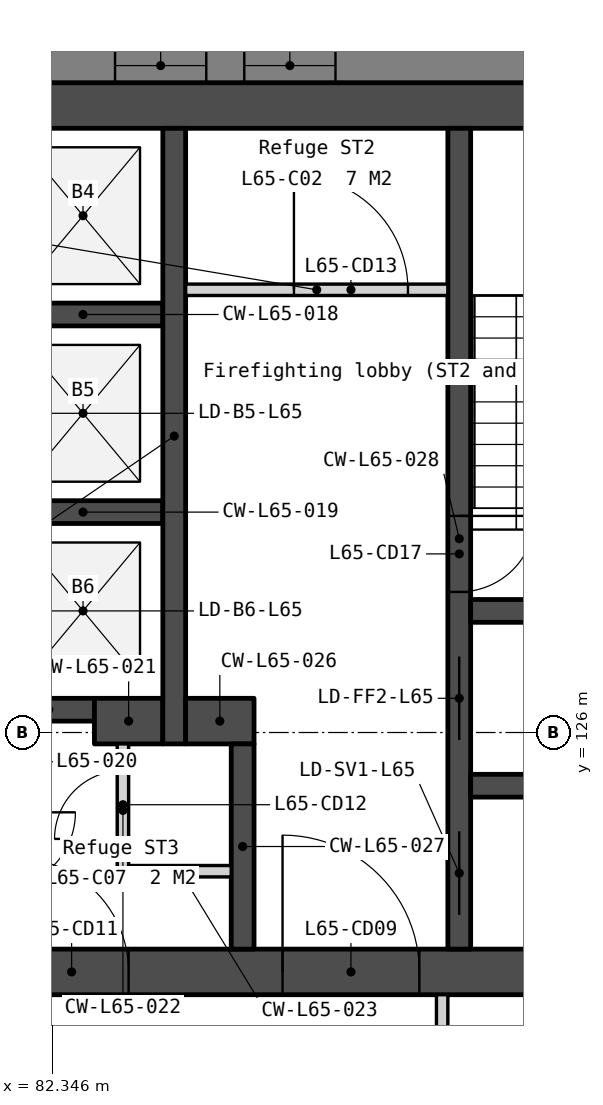
"""IFC4 building model, lengths in metres.
Left out: names, types, materials, properties, quantities, classifications, styles, units other than length and angle.
Written with IfcOpenShell. Run it as: python <this file> out.ifc"""

import sys

from ifc_helpers import new_model, si_unit, direction, frame, frame_2d, origin, place, context, subcontext, project, spatial, polyline, rectangle, outline, extrude, element, fill, save


model = new_model("IFC4")
c1 = context("Model", 3, precision=1e-05, world=origin(), true_north=direction((0.0, 1.0)))
c2 = subcontext(c1, "Body", "Model", "MODEL_VIEW")
j1 = project(units=[si_unit("LENGTHUNIT", "METRE"), si_unit("PLANEANGLEUNIT", "RADIAN")], contexts=[c1])
p1 = place(None, origin())
s1 = spatial("IfcSite", under=j1, at=p1, CompositionType="ELEMENT")
p2 = place(p1, origin())
s2 = spatial("IfcBuilding", under=s1, at=p2, CompositionType="ELEMENT")
p3 = place(p2, frame((0.0, 0.0, 266.0)))
s3 = spatial("IfcBuildingStorey", under=s2, at=p3, CompositionType="ELEMENT", Elevation=266.0)
p4 = place(p3, frame((69.0, 134.25, 0.0), z_axis=(0.0, 0.0, 1.0), x_axis=(1.0, 0.0, 0.0)))
e1 = element("IfcWall", 1, at=p4, inside=s3, PredefinedType="SOLIDWALL", context=c2, shape_type="SweptSolid", body=[
    extrude(rectangle(XDim=22.0, YDim=0.6, at=frame_2d((11.0, 0.0))), origin(), (0.0, 0.0, 1.0), 3.75),
])
p5 = place(p3, frame((69.0, 122.85, 0.0), z_axis=(0.0, 0.0, 1.0), x_axis=(1.0, 0.0, 0.0)))
e2 = element("IfcWall", 2, at=p5, inside=s3, PredefinedType="SOLIDWALL", context=c2, shape_type="SweptSolid", body=[
    extrude(rectangle(XDim=22.0, YDim=0.6, at=frame_2d((11.0, 0.0))), origin(), (0.0, 0.0, 1.0), 3.75),
])
p6 = place(p5, frame((16.375, 0.0, 0.0)))
e3 = element("IfcOpeningElement", 3, at=p6, cuts=e2, PredefinedType="OPENING", context=c2, shape_type="SweptSolid", body=[
    extrude(rectangle(XDim=1.8, YDim=2.1, at=frame_2d((0.9, 1.05))), frame((0.0, 0.31, 0.0), z_axis=(0.0, -1.0, 0.0), x_axis=(1.0, 0.0, 0.0)), (0.0, 0.0, 1.0), 0.62),
])
p7 = place(p5, frame((3.825, 0.0, 0.0)))
e4 = element("IfcOpeningElement", 4, at=p7, cuts=e2, PredefinedType="OPENING", context=c2, shape_type="SweptSolid", body=[
    extrude(rectangle(XDim=1.8, YDim=2.1, at=frame_2d((0.9, 1.05))), frame((0.0, 0.31, 0.0), z_axis=(0.0, -1.0, 0.0), x_axis=(1.0, 0.0, 0.0)), (0.0, 0.0, 1.0), 0.62),
])
p8 = place(p5, frame((12.85, 0.0, 0.0)))
e5 = element("IfcOpeningElement", 5, at=p8, cuts=e2, PredefinedType="OPENING", context=c2, shape_type="SweptSolid", body=[
    extrude(rectangle(XDim=1.5, YDim=2.1, at=frame_2d((0.75, 1.05))), frame((0.0, 0.31, 0.0), z_axis=(0.0, -1.0, 0.0), x_axis=(1.0, 0.0, 0.0)), (0.0, 0.0, 1.0), 0.62),
])
for number, where, z_axis, x_axis in (
    (6, (81.7, 131.5, 0.0), (0.0, 0.0, 1.0), (1.0, 0.0, 0.0)),
    (7, (81.7, 128.9, 0.0), (0.0, 0.0, 1.0), (1.0, 0.0, 0.0)),
):
    element("IfcWall", number, at=place(p3, frame(where, z_axis=z_axis, x_axis=x_axis)), inside=s3, PredefinedType="SOLIDWALL", context=c2, shape_type="SweptSolid", body=[
        extrude(rectangle(XDim=2.1, YDim=0.3, at=frame_2d((1.05, 0.0))), origin(), (0.0, 0.0, 1.0), 3.75),
    ])
p9 = place(p3, frame((81.7, 126.3, 0.0), z_axis=(0.0, 0.0, 1.0), x_axis=(1.0, 0.0, 0.0)))
e8 = element("IfcWall", 8, at=p9, inside=s3, PredefinedType="SOLIDWALL", context=c2, shape_type="SweptSolid", body=[
    extrude(rectangle(XDim=1.2, YDim=0.3, at=frame_2d((0.6, 0.0))), origin(), (0.0, 0.0, 1.0), 3.75),
])
p10 = place(p3, frame((82.9, 126.15, 0.0), z_axis=(0.0, 0.0, 1.0), x_axis=(1.0, 0.0, 0.0)))
e9 = element("IfcWall", 9, at=p10, inside=s3, PredefinedType="SOLIDWALL", context=c2, shape_type="SweptSolid", body=[
    extrude(rectangle(XDim=0.9, YDim=0.6, at=frame_2d((0.45, 0.0))), origin(), (0.0, 0.0, 1.0), 3.75),
])
p11 = place(p3, frame((83.275, 125.85, 0.0), z_axis=(0.0, 0.0, 1.0), x_axis=(0.0, -1.0, 0.0)))
e10 = element("IfcWall", 10, at=p11, inside=s3, PredefinedType="PARTITIONING", context=c2, shape_type="SweptSolid", body=[
    extrude(rectangle(XDim=1.75, YDim=0.15, at=frame_2d((0.875, 0.0))), origin(), (0.0, 0.0, 1.0), 3.75),
])
p12 = place(p11, frame((0.35, 0.0, 0.0)))
e11 = element("IfcOpeningElement", 11, at=p12, cuts=e10, PredefinedType="OPENING", context=c2, shape_type="SweptSolid", body=[
    extrude(rectangle(XDim=0.9, YDim=2.1, at=frame_2d((0.45, 1.05))), frame((0.0, 0.085, 0.0), z_axis=(0.0, -1.0, 0.0), x_axis=(1.0, 0.0, 0.0)), (0.0, 0.0, 1.0), 0.17),
])
p13 = place(p3, frame((83.35, 124.175, 0.0), z_axis=(0.0, 0.0, 1.0), x_axis=(1.0, 0.0, 0.0)))
e12 = element("IfcWall", 12, at=p13, inside=s3, PredefinedType="PARTITIONING", context=c2, shape_type="SweptSolid", body=[
    extrude(rectangle(XDim=1.35, YDim=0.15, at=frame_2d((0.675, 0.0))), origin(), (0.0, 0.0, 1.0), 3.75),
])
p14 = place(p3, frame((83.95, 133.95, 0.0), z_axis=(0.0, 0.0, 1.0), x_axis=(0.0, -1.0, 0.0)))
e13 = element("IfcWall", 13, at=p14, inside=s3, PredefinedType="SOLIDWALL", context=c2, shape_type="SweptSolid", body=[
    extrude(rectangle(XDim=8.1, YDim=0.3, at=frame_2d((4.05, 0.0))), origin(), (0.0, 0.0, 1.0), 3.75),
])
p15 = place(p3, frame((84.1, 131.825, 0.0), z_axis=(0.0, 0.0, 1.0), x_axis=(1.0, 0.0, 0.0)))
e14 = element("IfcWall", 14, at=p15, inside=s3, PredefinedType="PARTITIONING", context=c2, shape_type="SweptSolid", body=[
    extrude(rectangle(XDim=3.45, YDim=0.15, at=frame_2d((1.725, 0.0))), origin(), (0.0, 0.0, 1.0), 3.75),
])
p16 = place(p15, frame((1.425, 0.0, 0.0)))
e15 = element("IfcOpeningElement", 15, at=p16, cuts=e14, PredefinedType="OPENING", context=c2, shape_type="SweptSolid", body=[
    extrude(rectangle(XDim=1.5, YDim=2.1, at=frame_2d((0.75, 1.05))), frame((0.0, 0.085, 0.0), z_axis=(0.0, -1.0, 0.0), x_axis=(1.0, 0.0, 0.0)), (0.0, 0.0, 1.0), 0.17),
])
p17 = place(p3, frame((84.1, 126.15, 0.0), z_axis=(0.0, 0.0, 1.0), x_axis=(1.0, 0.0, 0.0)))
e16 = element("IfcWall", 16, at=p17, inside=s3, PredefinedType="SOLIDWALL", context=c2, shape_type="SweptSolid", body=[
    extrude(rectangle(XDim=0.9, YDim=0.6, at=frame_2d((0.45, 0.0))), origin(), (0.0, 0.0, 1.0), 3.75),
])
p18 = place(p3, frame((84.85, 125.85, 0.0), z_axis=(0.0, 0.0, 1.0), x_axis=(0.0, -1.0, 0.0)))
e17 = element("IfcWall", 17, at=p18, inside=s3, PredefinedType="SOLIDWALL", context=c2, shape_type="SweptSolid", body=[
    extrude(rectangle(XDim=2.7, YDim=0.3, at=frame_2d((1.35, 0.0))), origin(), (0.0, 0.0, 1.0), 3.75),
])
p19 = place(p3, frame((87.7, 133.95, 0.0), z_axis=(0.0, 0.0, 1.0), x_axis=(0.0, -1.0, 0.0)))
e18 = element("IfcWall", 18, at=p19, inside=s3, PredefinedType="SOLIDWALL", context=c2, shape_type="SweptSolid", body=[
    extrude(rectangle(XDim=10.8, YDim=0.3, at=frame_2d((5.4, 0.0))), origin(), (0.0, 0.0, 1.0), 3.75),
])
p20 = place(p19, frame((6.95, 0.0, 0.0)))
e19 = element("IfcOpeningElement", 19, at=p20, cuts=e18, PredefinedType="OPENING", context=c2, shape_type="SweptSolid", body=[
    extrude(rectangle(XDim=1.1, YDim=2.1, at=frame_2d((0.55, 1.05))), frame((0.0, 0.16, 0.0), z_axis=(0.0, -1.0, 0.0), x_axis=(1.0, 0.0, 0.0)), (0.0, 0.0, 1.0), 0.32),
])
p21 = place(p19, frame((5.1, 0.0, 0.0)))
e20 = element("IfcOpeningElement", 20, at=p21, cuts=e18, PredefinedType="OPENING", context=c2, shape_type="SweptSolid", body=[
    extrude(rectangle(XDim=1.0, YDim=2.1, at=frame_2d((0.5, 1.05))), frame((0.0, 0.16, 0.0), z_axis=(0.0, -1.0, 0.0), x_axis=(1.0, 0.0, 0.0)), (0.0, 0.0, 1.0), 0.32),
])
p22 = place(p19, frame((9.25, 0.0, 0.0)))
e21 = element("IfcOpeningElement", 21, at=p22, cuts=e18, PredefinedType="OPENING", context=c2, shape_type="SweptSolid", body=[
    extrude(rectangle(XDim=1.1, YDim=2.1, at=frame_2d((0.55, 1.05))), frame((0.0, 0.16, 0.0), z_axis=(0.0, -1.0, 0.0), x_axis=(1.0, 0.0, 0.0)), (0.0, 0.0, 1.0), 0.32),
])
for number, where, z_axis, x_axis in (
    (22, (87.85, 127.6, 0.0), (0.0, 0.0, 1.0), (1.0, 0.0, 0.0)),
    (23, (87.85, 125.3, 0.0), (0.0, 0.0, 1.0), (1.0, 0.0, 0.0)),
):
    element("IfcWall", number, at=place(p3, frame(where, z_axis=z_axis, x_axis=x_axis)), inside=s3, PredefinedType="SOLIDWALL", context=c2, shape_type="SweptSolid", body=[
        extrude(rectangle(XDim=2.55, YDim=0.3, at=frame_2d((1.275, 0.0))), origin(), (0.0, 0.0, 1.0), 3.75),
    ])
p23 = place(p3, frame((98.486, 134.775, -0.15), z_axis=(0.0, 0.0, 1.0), x_axis=(-1.0, 0.0, 0.0)))
e24 = element("IfcWall", 24, at=p23, inside=s3, PredefinedType="SOLIDWALL", context=c2, shape_type="SweptSolid", body=[
    extrude(outline(polyline([(36.972, 0.0), (36.972, 3.9), (0.0, 3.9), (0.0, 0.0), (36.972, 0.0)])), frame((0.0, 0.225, 0.0), z_axis=(0.0, -1.0, 0.0), x_axis=(1.0, 0.0, 0.0)), (0.0, 0.0, 1.0), 0.45),
])
p24 = place(p23, frame((3.172, 0.0, 0.95)))
e25 = element("IfcOpeningElement", 25, at=p24, cuts=e24, PredefinedType="OPENING", context=c2, shape_type="SweptSolid", body=[
    extrude(rectangle(XDim=1.2, YDim=2.2, at=frame_2d((0.6, 1.1))), frame((0.0, 0.235, 0.0), z_axis=(0.0, -1.0, 0.0), x_axis=(1.0, 0.0, 0.0)), (0.0, 0.0, 1.0), 0.47),
])
p25 = place(p23, frame((4.872, 0.0, 0.95)))
e26 = element("IfcOpeningElement", 26, at=p25, cuts=e24, PredefinedType="OPENING", context=c2, shape_type="SweptSolid", body=[
    extrude(rectangle(XDim=1.2, YDim=2.2, at=frame_2d((0.6, 1.1))), frame((0.0, 0.235, 0.0), z_axis=(0.0, -1.0, 0.0), x_axis=(1.0, 0.0, 0.0)), (0.0, 0.0, 1.0), 0.47),
])
p26 = place(p23, frame((12.415, 0.0, 0.95)))
e27 = element("IfcOpeningElement", 27, at=p26, cuts=e24, PredefinedType="OPENING", context=c2, shape_type="SweptSolid", body=[
    extrude(rectangle(XDim=1.2, YDim=2.2, at=frame_2d((0.6, 1.1))), frame((0.0, 0.235, 0.0), z_axis=(0.0, -1.0, 0.0), x_axis=(1.0, 0.0, 0.0)), (0.0, 0.0, 1.0), 0.47),
])
p27 = place(p23, frame((14.115, 0.0, 0.95)))
e28 = element("IfcOpeningElement", 28, at=p27, cuts=e24, PredefinedType="OPENING", context=c2, shape_type="SweptSolid", body=[
    extrude(rectangle(XDim=1.2, YDim=2.2, at=frame_2d((0.6, 1.1))), frame((0.0, 0.235, 0.0), z_axis=(0.0, -1.0, 0.0), x_axis=(1.0, 0.0, 0.0)), (0.0, 0.0, 1.0), 0.47),
])
p28 = place(p23, frame((21.658, 0.0, 0.95)))
e29 = element("IfcOpeningElement", 29, at=p28, cuts=e24, PredefinedType="OPENING", context=c2, shape_type="SweptSolid", body=[
    extrude(rectangle(XDim=1.2, YDim=2.2, at=frame_2d((0.6, 1.1))), frame((0.0, 0.235, 0.0), z_axis=(0.0, -1.0, 0.0), x_axis=(1.0, 0.0, 0.0)), (0.0, 0.0, 1.0), 0.47),
])
p29 = place(p23, frame((23.358, 0.0, 0.95)))
e30 = element("IfcOpeningElement", 30, at=p29, cuts=e24, PredefinedType="OPENING", context=c2, shape_type="SweptSolid", body=[
    extrude(rectangle(XDim=1.2, YDim=2.2, at=frame_2d((0.6, 1.1))), frame((0.0, 0.235, 0.0), z_axis=(0.0, -1.0, 0.0), x_axis=(1.0, 0.0, 0.0)), (0.0, 0.0, 1.0), 0.47),
])
p30 = place(p23, frame((30.901, 0.0, 0.95)))
e31 = element("IfcOpeningElement", 31, at=p30, cuts=e24, PredefinedType="OPENING", context=c2, shape_type="SweptSolid", body=[
    extrude(rectangle(XDim=1.2, YDim=2.2, at=frame_2d((0.6, 1.1))), frame((0.0, 0.235, 0.0), z_axis=(0.0, -1.0, 0.0), x_axis=(1.0, 0.0, 0.0)), (0.0, 0.0, 1.0), 0.47),
])
p31 = place(p23, frame((32.601, 0.0, 0.95)))
e32 = element("IfcOpeningElement", 32, at=p31, cuts=e24, PredefinedType="OPENING", context=c2, shape_type="SweptSolid", body=[
    extrude(rectangle(XDim=1.2, YDim=2.2, at=frame_2d((0.6, 1.1))), frame((0.0, 0.235, 0.0), z_axis=(0.0, -1.0, 0.0), x_axis=(1.0, 0.0, 0.0)), (0.0, 0.0, 1.0), 0.47),
])
p32 = place(p3, frame((80.905, 101.188, -0.15), z_axis=(0.0, 0.0, 1.0), x_axis=(0.500002536638, 0.866023939251, 0.0)))
e33 = element("IfcWall", 33, at=p32, inside=s3, PredefinedType="SOLIDWALL", context=c2, shape_type="SweptSolid", body=[
    extrude(outline(polyline([(36.972, 0.0), (36.972, 3.9), (0.0, 3.9), (0.0, 0.0), (36.972, 0.0)])), frame((0.0, 0.225, 0.0), z_axis=(0.0, -1.0, 0.0), x_axis=(1.0, 0.0, 0.0)), (0.0, 0.0, 1.0), 0.45),
])
p33 = place(p32, frame((3.172, 0.0, 0.95)))
e34 = element("IfcOpeningElement", 34, at=p33, cuts=e33, PredefinedType="OPENING", context=c2, shape_type="SweptSolid", body=[
    extrude(rectangle(XDim=1.2, YDim=2.2, at=frame_2d((0.6, 1.1))), frame((0.0, 0.235, 0.0), z_axis=(0.0, -1.0, 0.0), x_axis=(1.0, 0.0, 0.0)), (0.0, 0.0, 1.0), 0.47),
])
p34 = place(p32, frame((4.872, 0.0, 0.95)))
e35 = element("IfcOpeningElement", 35, at=p34, cuts=e33, PredefinedType="OPENING", context=c2, shape_type="SweptSolid", body=[
    extrude(rectangle(XDim=1.2, YDim=2.2, at=frame_2d((0.6, 1.1))), frame((0.0, 0.235, 0.0), z_axis=(0.0, -1.0, 0.0), x_axis=(1.0, 0.0, 0.0)), (0.0, 0.0, 1.0), 0.47),
])
p35 = place(p32, frame((12.415, 0.0, 0.95)))
e36 = element("IfcOpeningElement", 36, at=p35, cuts=e33, PredefinedType="OPENING", context=c2, shape_type="SweptSolid", body=[
    extrude(rectangle(XDim=1.2, YDim=2.2, at=frame_2d((0.6, 1.1))), frame((0.0, 0.235, 0.0), z_axis=(0.0, -1.0, 0.0), x_axis=(1.0, 0.0, 0.0)), (0.0, 0.0, 1.0), 0.47),
])
p36 = place(p32, frame((14.115, 0.0, 0.95)))
e37 = element("IfcOpeningElement", 37, at=p36, cuts=e33, PredefinedType="OPENING", context=c2, shape_type="SweptSolid", body=[
    extrude(rectangle(XDim=1.2, YDim=2.2, at=frame_2d((0.6, 1.1))), frame((0.0, 0.235, 0.0), z_axis=(0.0, -1.0, 0.0), x_axis=(1.0, 0.0, 0.0)), (0.0, 0.0, 1.0), 0.47),
])
p37 = place(p32, frame((21.658, 0.0, 0.95)))
e38 = element("IfcOpeningElement", 38, at=p37, cuts=e33, PredefinedType="OPENING", context=c2, shape_type="SweptSolid", body=[
    extrude(rectangle(XDim=1.2, YDim=2.2, at=frame_2d((0.6, 1.1))), frame((0.0, 0.235, 0.0), z_axis=(0.0, -1.0, 0.0), x_axis=(1.0, 0.0, 0.0)), (0.0, 0.0, 1.0), 0.47),
])
p38 = place(p32, frame((23.358, 0.0, 0.95)))
e39 = element("IfcOpeningElement", 39, at=p38, cuts=e33, PredefinedType="OPENING", context=c2, shape_type="SweptSolid", body=[
    extrude(rectangle(XDim=1.2, YDim=2.2, at=frame_2d((0.6, 1.1))), frame((0.0, 0.235, 0.0), z_axis=(0.0, -1.0, 0.0), x_axis=(1.0, 0.0, 0.0)), (0.0, 0.0, 1.0), 0.47),
])
p39 = place(p32, frame((30.901, 0.0, 0.95)))
e40 = element("IfcOpeningElement", 40, at=p39, cuts=e33, PredefinedType="OPENING", context=c2, shape_type="SweptSolid", body=[
    extrude(rectangle(XDim=1.2, YDim=2.2, at=frame_2d((0.6, 1.1))), frame((0.0, 0.235, 0.0), z_axis=(0.0, -1.0, 0.0), x_axis=(1.0, 0.0, 0.0)), (0.0, 0.0, 1.0), 0.47),
])
p40 = place(p32, frame((32.601, 0.0, 0.95)))
e41 = element("IfcOpeningElement", 41, at=p40, cuts=e33, PredefinedType="OPENING", context=c2, shape_type="SweptSolid", body=[
    extrude(rectangle(XDim=1.2, YDim=2.2, at=frame_2d((0.6, 1.1))), frame((0.0, 0.235, 0.0), z_axis=(0.0, -1.0, 0.0), x_axis=(1.0, 0.0, 0.0)), (0.0, 0.0, 1.0), 0.47),
])
p41 = place(p3, frame((87.475, 120.025, 0.0), z_axis=(0.0, 0.0, 1.0), x_axis=(9.6693096e-05, 0.999999995325, 0.0)))
e42 = element("IfcWall", 42, at=p41, inside=s3, PredefinedType="PARTITIONING", context=c2, shape_type="SweptSolid", body=[
    extrude(rectangle(XDim=2.525, YDim=0.15, at=frame_2d((1.262, 0.0))), origin(), (0.0, 0.0, 1.0), 3.75),
])
p42 = place(p20, origin())
e43 = element("IfcDoor", 43, at=p42, inside=s3, OperationType="SLIDING_TO_LEFT", PredefinedType="DOOR", context=c2, shape_type="SweptSolid", body=[
    extrude(rectangle(XDim=1.1, YDim=2.1, at=frame_2d((0.55, 1.05))), frame((0.0, 0.025, 0.0), z_axis=(0.0, -1.0, 0.0), x_axis=(1.0, 0.0, 0.0)), (0.0, 0.0, 1.0), 0.05),
])
fill(e19, e43)
p43 = place(p6, origin())
e44 = element("IfcDoor", 44, at=p43, inside=s3, OperationType="DOUBLE_DOOR_DOUBLE_SWING", PredefinedType="DOOR", context=c2, shape_type="SweptSolid", body=[
    extrude(rectangle(XDim=1.8, YDim=2.1, at=frame_2d((0.9, 1.05))), frame((0.0, 0.025, 0.0), z_axis=(0.0, -1.0, 0.0), x_axis=(1.0, 0.0, 0.0)), (0.0, 0.0, 1.0), 0.05),
])
fill(e3, e44)
p44 = place(p8, origin())
e45 = element("IfcDoor", 45, at=p44, inside=s3, OperationType="DOUBLE_DOOR_DOUBLE_SWING", PredefinedType="DOOR", context=c2, shape_type="SweptSolid", body=[
    extrude(rectangle(XDim=1.5, YDim=2.1, at=frame_2d((0.75, 1.05))), frame((0.0, 0.025, 0.0), z_axis=(0.0, -1.0, 0.0), x_axis=(1.0, 0.0, 0.0)), (0.0, 0.0, 1.0), 0.05),
])
fill(e5, e45)
p45 = place(p12, origin())
e46 = element("IfcDoor", 46, at=p45, inside=s3, OperationType="SINGLE_SWING_RIGHT", PredefinedType="DOOR", context=c2, shape_type="SweptSolid", body=[
    extrude(rectangle(XDim=0.9, YDim=2.1, at=frame_2d((0.45, 1.05))), frame((0.0, 0.025, 0.0), z_axis=(0.0, -1.0, 0.0), x_axis=(1.0, 0.0, 0.0)), (0.0, 0.0, 1.0), 0.05),
])
fill(e11, e46)
p46 = place(p16, origin())
e47 = element("IfcDoor", 47, at=p46, inside=s3, OperationType="DOUBLE_DOOR_DOUBLE_SWING", PredefinedType="DOOR", context=c2, shape_type="SweptSolid", body=[
    extrude(rectangle(XDim=1.5, YDim=2.1, at=frame_2d((0.75, 1.05))), frame((0.0, 0.025, 0.0), z_axis=(0.0, -1.0, 0.0), x_axis=(1.0, 0.0, 0.0)), (0.0, 0.0, 1.0), 0.05),
])
fill(e15, e47)
p47 = place(p21, origin())
e48 = element("IfcDoor", 48, at=p47, inside=s3, OperationType="SINGLE_SWING_LEFT", PredefinedType="DOOR", context=c2, shape_type="SweptSolid", body=[
    extrude(rectangle(XDim=1.0, YDim=2.1, at=frame_2d((0.5, 1.05))), frame((0.0, 0.025, 0.0), z_axis=(0.0, -1.0, 0.0), x_axis=(1.0, 0.0, 0.0)), (0.0, 0.0, 1.0), 0.05),
])
fill(e20, e48)
p48 = place(p22, origin())
e49 = element("IfcDoor", 49, at=p48, inside=s3, OperationType="SLIDING_TO_LEFT", PredefinedType="DOOR", context=c2, shape_type="SweptSolid", body=[
    extrude(rectangle(XDim=1.1, YDim=2.1, at=frame_2d((0.55, 1.05))), frame((0.0, 0.025, 0.0), z_axis=(0.0, -1.0, 0.0), x_axis=(1.0, 0.0, 0.0)), (0.0, 0.0, 1.0), 0.05),
])
fill(e21, e49)
p49 = place(p26, origin())
e50 = element("IfcWindow", 50, at=p49, inside=s3, PartitioningType="SINGLE_PANEL", PredefinedType="WINDOW", context=c2, shape_type="SweptSolid", body=[
    extrude(rectangle(XDim=1.2, YDim=2.2, at=frame_2d((0.6, 1.1))), frame((0.0, 0.03, 0.0), z_axis=(0.0, -1.0, 0.0), x_axis=(1.0, 0.0, 0.0)), (0.0, 0.0, 1.0), 0.06),
])
fill(e27, e50)
p50 = place(p27, origin())
e51 = element("IfcWindow", 51, at=p50, inside=s3, PartitioningType="SINGLE_PANEL", PredefinedType="WINDOW", context=c2, shape_type="SweptSolid", body=[
    extrude(rectangle(XDim=1.2, YDim=2.2, at=frame_2d((0.6, 1.1))), frame((0.0, 0.03, 0.0), z_axis=(0.0, -1.0, 0.0), x_axis=(1.0, 0.0, 0.0)), (0.0, 0.0, 1.0), 0.06),
])
fill(e28, e51)
save(model, sys.argv[1])
